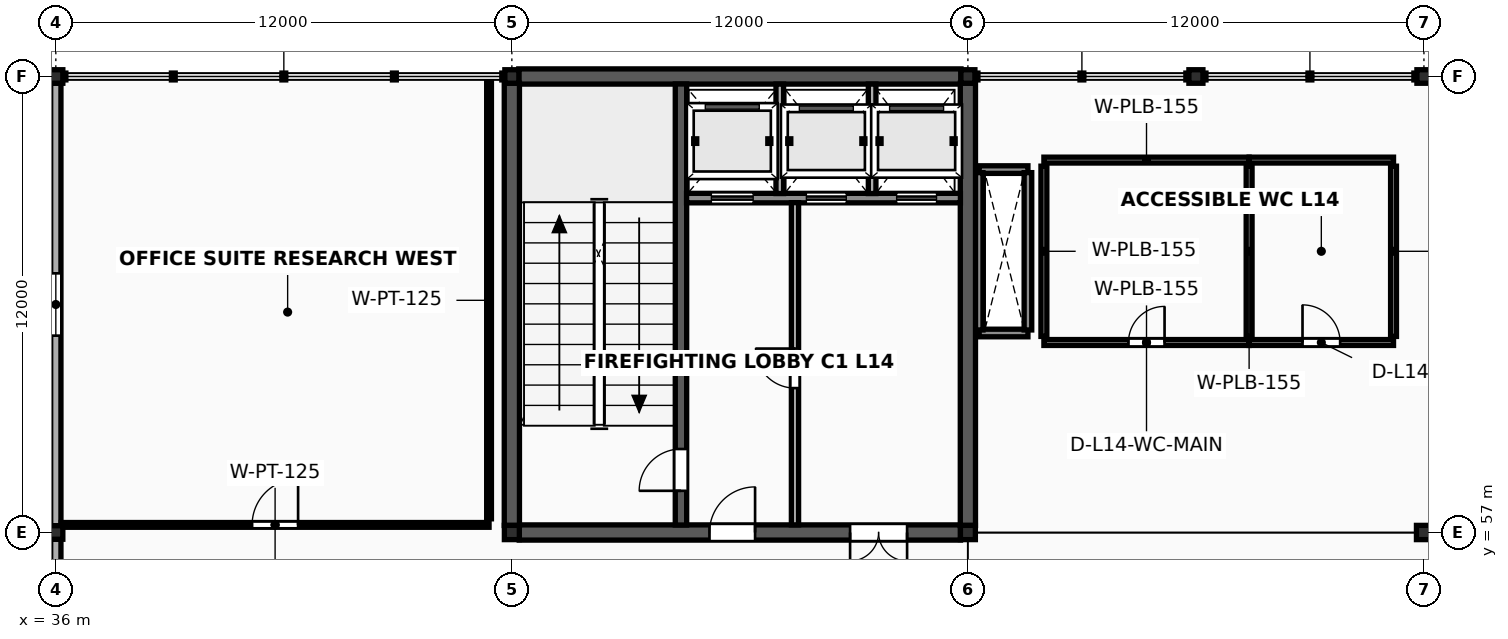
"""IFC4 building model, lengths in metres.
Left out: names, types, materials, properties, quantities, classifications, styles, units other than length and angle.
Written with IfcOpenShell. Run it as: python <this file> out.ifc"""

import sys

from ifc_helpers import new_model, si_unit, direction, frame, frame_2d, origin, origin_2d, place, context, subcontext, project, spatial, rectangle, i_section, extrude, element, fill, save


model = new_model("IFC4")
c1 = context("Model", 3, precision=1e-05, world=origin(), true_north=direction((0.0, 1.0)))
c2 = subcontext(c1, "Body", "Model", "MODEL_VIEW")
j1 = project(units=[si_unit("LENGTHUNIT", "METRE"), si_unit("PLANEANGLEUNIT", "RADIAN")], contexts=[c1])
p1 = place(None, origin())
s1 = spatial("IfcSite", under=j1, at=p1, CompositionType="ELEMENT")
p2 = place(p1, origin())
s2 = spatial("IfcBuilding", under=s1, at=p2, CompositionType="ELEMENT")
p3 = place(p2, frame((0.0, 0.0, 57.6)))
s3 = spatial("IfcBuildingStorey", under=s2, at=p3, CompositionType="ELEMENT", Elevation=57.6)
for number, where, z_axis, x_axis in (
    (1, (36.0, 57.0, 0.0), (0.0, 0.0, 1.0), (1.0, 0.0, 0.0)),
    (2, (36.0, 69.0, 0.0), (0.0, 0.0, 1.0), (1.0, 0.0, 0.0)),
):
    element("IfcColumn", number, at=place(p3, frame(where, z_axis=z_axis, x_axis=x_axis)), inside=s3, PredefinedType="COLUMN", context=c2, shape_type="SweptSolid", body=[
        extrude(i_section(OverallWidth=0.369, OverallDepth=0.356, WebThickness=0.011, FlangeThickness=0.018, FilletRadius=0.018, at=origin_2d()), origin(), (0.0, 0.0, 1.0), 4.0),
    ])
p4 = place(p3, frame((48.0, 57.0, 0.0), z_axis=(0.0, 0.0, 1.0), x_axis=(1.0, 0.0, 0.0)))
e3 = element("IfcColumn", 3, at=p4, inside=s3, PredefinedType="COLUMN", context=c2, shape_type="SweptSolid", body=[
    extrude(i_section(OverallWidth=0.394, OverallDepth=0.375, WebThickness=0.017, FlangeThickness=0.028, FilletRadius=0.018, at=origin_2d()), origin(), (0.0, 0.0, 1.0), 4.0),
])
p5 = place(p3, frame((48.0, 69.0, 0.0), z_axis=(0.0, 0.0, 1.0), x_axis=(1.0, 0.0, 0.0)))
e4 = element("IfcColumn", 4, at=p5, inside=s3, PredefinedType="COLUMN", context=c2, shape_type="SweptSolid", body=[
    extrude(i_section(OverallWidth=0.369, OverallDepth=0.356, WebThickness=0.011, FlangeThickness=0.018, FilletRadius=0.018, at=origin_2d()), origin(), (0.0, 0.0, 1.0), 4.0),
])
p6 = place(p3, frame((60.0, 57.0, 0.0), z_axis=(0.0, 0.0, 1.0), x_axis=(1.0, 0.0, 0.0)))
e5 = element("IfcColumn", 5, at=p6, inside=s3, PredefinedType="COLUMN", context=c2, shape_type="SweptSolid", body=[
    extrude(i_section(OverallWidth=0.394, OverallDepth=0.375, WebThickness=0.017, FlangeThickness=0.028, FilletRadius=0.018, at=origin_2d()), origin(), (0.0, 0.0, 1.0), 4.0),
])
p7 = place(p3, frame((60.0, 69.0, 0.0), z_axis=(0.0, 0.0, 1.0), x_axis=(1.0, 0.0, 0.0)))
e6 = element("IfcColumn", 6, at=p7, inside=s3, PredefinedType="COLUMN", context=c2, shape_type="SweptSolid", body=[
    extrude(i_section(OverallWidth=0.369, OverallDepth=0.356, WebThickness=0.011, FlangeThickness=0.018, FilletRadius=0.018, at=origin_2d()), origin(), (0.0, 0.0, 1.0), 4.0),
])
p8 = place(p3, frame((72.0, 57.0, 0.0), z_axis=(0.0, 0.0, 1.0), x_axis=(1.0, 0.0, 0.0)))
e7 = element("IfcColumn", 7, at=p8, inside=s3, PredefinedType="COLUMN", context=c2, shape_type="SweptSolid", body=[
    extrude(i_section(OverallWidth=0.394, OverallDepth=0.375, WebThickness=0.017, FlangeThickness=0.028, FilletRadius=0.018, at=origin_2d()), origin(), (0.0, 0.0, 1.0), 4.0),
])
for number, where, z_axis, x_axis in (
    (8, (72.0, 69.0, 0.0), (0.0, 0.0, 1.0), (1.0, 0.0, 0.0)),
    (9, (66.0, 69.0, 0.0), (0.0, 0.0, 1.0), (1.0, 0.0, 0.0)),
):
    element("IfcColumn", number, at=place(p3, frame(where, z_axis=z_axis, x_axis=x_axis)), inside=s3, PredefinedType="COLUMN", context=c2, shape_type="SweptSolid", body=[
        extrude(i_section(OverallWidth=0.369, OverallDepth=0.356, WebThickness=0.011, FlangeThickness=0.018, FilletRadius=0.018, at=origin_2d()), origin(), (0.0, 0.0, 1.0), 4.0),
    ])
for number, where, z_axis, x_axis in (
    (10, (60.297, 62.25, 0.0), (0.0, 0.0, 1.0), (1.0, 0.0, 0.0)),
    (11, (60.297, 66.55, 0.0), (0.0, 0.0, 1.0), (1.0, 0.0, 0.0)),
):
    element("IfcWall", number, at=place(p3, frame(where, z_axis=z_axis, x_axis=x_axis)), inside=s3, PredefinedType="SOLIDWALL", context=c2, shape_type="SweptSolid", body=[
        extrude(rectangle(XDim=1.283, YDim=0.2, at=frame_2d((0.642, 0.0))), origin(), (0.0, 0.0, 1.0), 3.853),
    ])
for number, where, z_axis, x_axis in (
    (12, (60.297, 62.33, 0.0), (0.0, 0.0, 1.0), (0.0, 1.0, 0.0)),
    (13, (61.58, 62.33, 0.0), (0.0, 0.0, 1.0), (0.0, 1.0, 0.0)),
):
    element("IfcWall", number, at=place(p3, frame(where, z_axis=z_axis, x_axis=x_axis)), inside=s3, PredefinedType="SOLIDWALL", context=c2, shape_type="SweptSolid", body=[
        extrude(rectangle(XDim=4.14, YDim=0.2, at=frame_2d((2.07, 0.0))), origin(), (0.0, 0.0, 1.0), 3.853),
    ])
p9 = place(p3, frame((48.194, 57.0, 0.0), z_axis=(0.0, 0.0, 1.0), x_axis=(1.0, 0.0, 0.0)))
e14 = element("IfcWall", 14, at=p9, inside=s3, PredefinedType="SHEAR", context=c2, shape_type="SweptSolid", body=[
    extrude(rectangle(XDim=11.612, YDim=0.4, at=frame_2d((5.806, 0.0))), origin(), (0.0, 0.0, 1.0), 3.853),
])
p10 = place(p9, frame((5.006, 0.0, 0.0)))
e15 = element("IfcOpeningElement", 15, at=p10, cuts=e14, PredefinedType="OPENING", context=c2, shape_type="SweptSolid", body=[
    extrude(rectangle(XDim=1.2, YDim=2.2, at=frame_2d((0.6, 1.1))), frame((0.0, 0.215, 0.0), z_axis=(0.0, -1.0, 0.0), x_axis=(1.0, 0.0, 0.0)), (0.0, 0.0, 1.0), 0.43),
])
p11 = place(p9, frame((8.706, 0.0, 0.0)))
e16 = element("IfcOpeningElement", 16, at=p11, cuts=e14, PredefinedType="OPENING", context=c2, shape_type="SweptSolid", body=[
    extrude(rectangle(XDim=1.5, YDim=2.25, at=frame_2d((0.75, 1.125))), frame((0.0, 0.215, 0.0), z_axis=(0.0, -1.0, 0.0), x_axis=(1.0, 0.0, 0.0)), (0.0, 0.0, 1.0), 0.43),
])
p12 = place(p3, frame((48.181, 69.0, 0.0), z_axis=(0.0, 0.0, 1.0), x_axis=(1.0, 0.0, 0.0)))
e17 = element("IfcWall", 17, at=p12, inside=s3, PredefinedType="SHEAR", context=c2, shape_type="SweptSolid", body=[
    extrude(rectangle(XDim=11.637, YDim=0.4, at=frame_2d((5.819, 0.0))), origin(), (0.0, 0.0, 1.0), 3.853),
])
for number, where, z_axis, x_axis in (
    (18, (48.0, 57.185, 0.0), (0.0, 0.0, 1.0), (0.0, 1.0, 0.0)),
    (19, (60.0, 57.185, 0.0), (0.0, 0.0, 1.0), (0.0, 1.0, 0.0)),
):
    element("IfcWall", number, at=place(p3, frame(where, z_axis=z_axis, x_axis=x_axis)), inside=s3, PredefinedType="SHEAR", context=c2, shape_type="SweptSolid", body=[
        extrude(rectangle(XDim=11.64, YDim=0.4, at=frame_2d((5.82, 0.0))), origin(), (0.0, 0.0, 1.0), 3.853),
    ])
p13 = place(p3, frame((52.45, 57.197, 0.0), z_axis=(0.0, 0.0, 1.0), x_axis=(0.0, 1.0, 0.0)))
e20 = element("IfcWall", 20, at=p13, inside=s3, PredefinedType="SHEAR", context=c2, shape_type="SweptSolid", body=[
    extrude(rectangle(XDim=11.606, YDim=0.3, at=frame_2d((5.803, 0.0))), origin(), (0.0, 0.0, 1.0), 3.853),
])
p14 = place(p13, frame((0.9, 0.0, 0.0)))
e21 = element("IfcOpeningElement", 21, at=p14, cuts=e20, PredefinedType="OPENING", context=c2, shape_type="SweptSolid", body=[
    extrude(rectangle(XDim=1.1, YDim=2.2, at=frame_2d((0.55, 1.1))), frame((0.0, 0.165, 0.0), z_axis=(0.0, -1.0, 0.0), x_axis=(1.0, 0.0, 0.0)), (0.0, 0.0, 1.0), 0.33),
])
p15 = place(p3, frame((52.597, 65.8, 0.0), z_axis=(0.0, 0.0, 1.0), x_axis=(1.0, 0.0, 0.0)))
e22 = element("IfcWall", 22, at=p15, inside=s3, PredefinedType="SOLIDWALL", context=c2, shape_type="SweptSolid", body=[
    extrude(rectangle(XDim=7.206, YDim=0.25, at=frame_2d((3.603, 0.0))), origin(), (0.0, 0.0, 1.0), 3.853),
])
p16 = place(p15, frame((0.653, 0.0, 0.0)))
e23 = element("IfcOpeningElement", 23, at=p16, cuts=e22, PredefinedType="OPENING", context=c2, shape_type="SweptSolid", body=[
    extrude(rectangle(XDim=1.1, YDim=2.24, at=frame_2d((0.55, 1.12))), frame((0.0, 0.14, 0.0), z_axis=(0.0, -1.0, 0.0), x_axis=(1.0, 0.0, 0.0)), (0.0, 0.0, 1.0), 0.28),
])
p17 = place(p15, frame((3.153, 0.0, 0.0)))
e24 = element("IfcOpeningElement", 24, at=p17, cuts=e22, PredefinedType="OPENING", context=c2, shape_type="SweptSolid", body=[
    extrude(rectangle(XDim=1.05, YDim=2.2, at=frame_2d((0.525, 1.1))), frame((0.0, 0.14, 0.0), z_axis=(0.0, -1.0, 0.0), x_axis=(1.0, 0.0, 0.0)), (0.0, 0.0, 1.0), 0.28),
])
p18 = place(p15, frame((5.528, 0.0, 0.0)))
e25 = element("IfcOpeningElement", 25, at=p18, cuts=e22, PredefinedType="OPENING", context=c2, shape_type="SweptSolid", body=[
    extrude(rectangle(XDim=1.05, YDim=2.2, at=frame_2d((0.525, 1.1))), frame((0.0, 0.14, 0.0), z_axis=(0.0, -1.0, 0.0), x_axis=(1.0, 0.0, 0.0)), (0.0, 0.0, 1.0), 0.28),
])
for number, where, z_axis, x_axis in (
    (26, (55.05, 65.92, 0.0), (0.0, 0.0, 1.0), (0.0, 1.0, 0.0)),
    (27, (57.48, 65.92, 0.0), (0.0, 0.0, 1.0), (0.0, 1.0, 0.0)),
):
    element("IfcWall", number, at=place(p3, frame(where, z_axis=z_axis, x_axis=x_axis)), inside=s3, PredefinedType="SOLIDWALL", context=c2, shape_type="SweptSolid", body=[
        extrude(rectangle(XDim=2.88, YDim=0.2, at=frame_2d((1.44, 0.0))), origin(), (0.0, 0.0, 1.0), 3.843),
    ])
p19 = place(p3, frame((55.45, 57.2, 0.0), z_axis=(0.0, 0.0, 1.0), x_axis=(0.0, 1.0, 0.0)))
e28 = element("IfcWall", 28, at=p19, inside=s3, PredefinedType="SOLIDWALL", context=c2, shape_type="SweptSolid", body=[
    extrude(rectangle(XDim=8.48, YDim=0.19, at=frame_2d((4.24, 0.0))), origin(), (0.0, 0.0, 1.0), 3.843),
])
p20 = place(p19, frame((3.6, 0.0, 0.0)))
e29 = element("IfcOpeningElement", 29, at=p20, cuts=e28, PredefinedType="OPENING", context=c2, shape_type="SweptSolid", body=[
    extrude(rectangle(XDim=1.04, YDim=2.18, at=frame_2d((0.52, 1.09))), frame((0.0, 0.11, 0.0), z_axis=(0.0, -1.0, 0.0), x_axis=(1.0, 0.0, 0.0)), (0.0, 0.0, 1.0), 0.22),
])
p21 = place(p3, frame((36.0, 45.176, 0.0), z_axis=(0.0, 0.0, 1.0), x_axis=(0.0, 1.0, 0.0)))
e30 = element("IfcWall", 30, at=p21, inside=s3, PredefinedType="SOLIDWALL", context=c2, shape_type="SweptSolid", body=[
    extrude(rectangle(XDim=11.648, YDim=0.27, at=frame_2d((5.824, 0.0))), origin(), (0.0, 0.0, 1.0), 3.216),
])
p22 = place(p21, frame((5.094, 0.0, 0.78)))
e31 = element("IfcOpeningElement", 31, at=p22, cuts=e30, PredefinedType="OPENING", context=c2, shape_type="SweptSolid", body=[
    extrude(rectangle(XDim=1.46, YDim=1.74, at=frame_2d((0.73, 0.87))), frame((0.0, 0.15, 0.0), z_axis=(0.0, -1.0, 0.0), x_axis=(1.0, 0.0, 0.0)), (0.0, 0.0, 1.0), 0.3),
])
p23 = place(p3, frame((36.0, 57.176, 0.0), z_axis=(0.0, 0.0, 1.0), x_axis=(0.0, 1.0, 0.0)))
e32 = element("IfcWall", 32, at=p23, inside=s3, PredefinedType="SOLIDWALL", context=c2, shape_type="SweptSolid", body=[
    extrude(rectangle(XDim=11.648, YDim=0.27, at=frame_2d((5.824, 0.0))), origin(), (0.0, 0.0, 1.0), 3.216),
])
p24 = place(p23, frame((5.004, 0.0, 0.78)))
e33 = element("IfcOpeningElement", 33, at=p24, cuts=e32, PredefinedType="OPENING", context=c2, shape_type="SweptSolid", body=[
    extrude(rectangle(XDim=1.64, YDim=1.74, at=frame_2d((0.82, 0.87))), frame((0.0, 0.15, 0.0), z_axis=(0.0, -1.0, 0.0), x_axis=(1.0, 0.0, 0.0)), (0.0, 0.0, 1.0), 0.3),
])
p25 = place(p3, frame((62.0, 62.0, 0.0), z_axis=(0.0, 0.0, 1.0), x_axis=(1.0, 0.0, 0.0)))
e34 = element("IfcWall", 34, at=p25, inside=s3, PredefinedType="PLUMBINGWALL", context=c2, shape_type="SweptSolid", body=[
    extrude(rectangle(XDim=5.4, YDim=0.155, at=frame_2d((2.7, 0.0))), origin(), (0.0, 0.0, 1.0), 2.88),
])
p26 = place(p25, frame((2.225, 0.0, 0.0)))
e35 = element("IfcOpeningElement", 35, at=p26, cuts=e34, PredefinedType="OPENING", context=c2, shape_type="SweptSolid", body=[
    extrude(rectangle(XDim=0.95, YDim=2.13, at=frame_2d((0.475, 1.065))), frame((0.0, 0.093, 0.0), z_axis=(0.0, -1.0, 0.0), x_axis=(1.0, 0.0, 0.0)), (0.0, 0.0, 1.0), 0.185),
])
p27 = place(p3, frame((62.0, 66.8, 0.0), z_axis=(0.0, 0.0, 1.0), x_axis=(1.0, 0.0, 0.0)))
e36 = element("IfcWall", 36, at=p27, inside=s3, PredefinedType="PLUMBINGWALL", context=c2, shape_type="SweptSolid", body=[
    extrude(rectangle(XDim=5.4, YDim=0.155, at=frame_2d((2.7, 0.0))), origin(), (0.0, 0.0, 1.0), 2.88),
])
for number, where, z_axis, x_axis in (
    (37, (62.0, 62.16, 0.0), (0.0, 0.0, 1.0), (0.0, 1.0, 0.0)),
    (38, (67.4, 62.16, 0.0), (0.0, 0.0, 1.0), (0.0, 1.0, 0.0)),
):
    element("IfcWall", number, at=place(p3, frame(where, z_axis=z_axis, x_axis=x_axis)), inside=s3, PredefinedType="PLUMBINGWALL", context=c2, shape_type="SweptSolid", body=[
        extrude(rectangle(XDim=4.48, YDim=0.155, at=frame_2d((2.24, 0.0))), origin(), (0.0, 0.0, 1.0), 2.88),
    ])
p28 = place(p3, frame((67.4, 62.0, 0.0), z_axis=(0.0, 0.0, 1.0), x_axis=(1.0, 0.0, 0.0)))
e39 = element("IfcWall", 39, at=p28, inside=s3, PredefinedType="PLUMBINGWALL", context=c2, shape_type="SweptSolid", body=[
    extrude(rectangle(XDim=3.8, YDim=0.155, at=frame_2d((1.9, 0.0))), origin(), (0.0, 0.0, 1.0), 2.88),
])
p29 = place(p28, frame((1.405, 0.0, 0.0)))
e40 = element("IfcOpeningElement", 40, at=p29, cuts=e39, PredefinedType="OPENING", context=c2, shape_type="SweptSolid", body=[
    extrude(rectangle(XDim=0.99, YDim=2.15, at=frame_2d((0.495, 1.075))), frame((0.0, 0.093, 0.0), z_axis=(0.0, -1.0, 0.0), x_axis=(1.0, 0.0, 0.0)), (0.0, 0.0, 1.0), 0.185),
])
p30 = place(p3, frame((67.4, 66.8, 0.0), z_axis=(0.0, 0.0, 1.0), x_axis=(1.0, 0.0, 0.0)))
e41 = element("IfcWall", 41, at=p30, inside=s3, PredefinedType="PLUMBINGWALL", context=c2, shape_type="SweptSolid", body=[
    extrude(rectangle(XDim=3.8, YDim=0.155, at=frame_2d((1.9, 0.0))), origin(), (0.0, 0.0, 1.0), 2.88),
])
p31 = place(p3, frame((71.2, 62.16, 0.0), z_axis=(0.0, 0.0, 1.0), x_axis=(0.0, 1.0, 0.0)))
e42 = element("IfcWall", 42, at=p31, inside=s3, PredefinedType="PLUMBINGWALL", context=c2, shape_type="SweptSolid", body=[
    extrude(rectangle(XDim=4.48, YDim=0.155, at=frame_2d((2.24, 0.0))), origin(), (0.0, 0.0, 1.0), 2.88),
])
p32 = place(p3, frame((36.14, 57.2, 0.0), z_axis=(0.0, 0.0, 1.0), x_axis=(1.0, 0.0, 0.0)))
e43 = element("IfcWall", 43, at=p32, inside=s3, PredefinedType="PARTITIONING", context=c2, shape_type="SweptSolid", body=[
    extrude(rectangle(XDim=11.26, YDim=0.125, at=frame_2d((5.63, 0.0))), origin(), (0.0, 0.0, 1.0), 2.88),
])
p33 = place(p32, frame((5.025, 0.0, 0.0)))
e44 = element("IfcOpeningElement", 44, at=p33, cuts=e43, PredefinedType="OPENING", context=c2, shape_type="SweptSolid", body=[
    extrude(rectangle(XDim=1.21, YDim=2.25, at=frame_2d((0.605, 1.125))), frame((0.0, 0.077, 0.0), z_axis=(0.0, -1.0, 0.0), x_axis=(1.0, 0.0, 0.0)), (0.0, 0.0, 1.0), 0.155),
])
p34 = place(p3, frame((47.4, 57.36, 0.0), z_axis=(0.0, 0.0, 1.0), x_axis=(0.0, 1.0, 0.0)))
e45 = element("IfcWall", 45, at=p34, inside=s3, PredefinedType="PARTITIONING", context=c2, shape_type="SweptSolid", body=[
    extrude(rectangle(XDim=11.5, YDim=0.125, at=frame_2d((5.75, 0.0))), origin(), (0.0, 0.0, 1.0), 2.88),
])
p35 = place(p24, origin())
e46 = element("IfcWindow", 46, at=p35, inside=s3, PartitioningType="SINGLE_PANEL", PredefinedType="WINDOW", context=c2, shape_type="SweptSolid", body=[
    extrude(rectangle(XDim=1.64, YDim=1.74, at=frame_2d((0.82, 0.87))), frame((0.0, 0.03, 0.0), z_axis=(0.0, -1.0, 0.0), x_axis=(1.0, 0.0, 0.0)), (0.0, 0.0, 1.0), 0.06),
])
fill(e33, e46)
p36 = place(p14, origin())
e47 = element("IfcDoor", 47, at=p36, inside=s3, OperationType="SINGLE_SWING_LEFT", PredefinedType="DOOR", context=c2, shape_type="SweptSolid", body=[
    extrude(rectangle(XDim=1.1, YDim=2.2, at=frame_2d((0.55, 1.1))), frame((0.0, 0.025, 0.0), z_axis=(0.0, -1.0, 0.0), x_axis=(1.0, 0.0, 0.0)), (0.0, 0.0, 1.0), 0.05),
])
fill(e21, e47)
p37 = place(p20, origin())
e48 = element("IfcDoor", 48, at=p37, inside=s3, OperationType="SINGLE_SWING_RIGHT", PredefinedType="DOOR", context=c2, shape_type="SweptSolid", body=[
    extrude(rectangle(XDim=1.04, YDim=2.18, at=frame_2d((0.52, 1.09))), frame((0.0, 0.025, 0.0), z_axis=(0.0, -1.0, 0.0), x_axis=(1.0, 0.0, 0.0)), (0.0, 0.0, 1.0), 0.05),
])
fill(e29, e48)
p38 = place(p10, origin())
e49 = element("IfcDoor", 49, at=p38, inside=s3, OperationType="SINGLE_SWING_RIGHT", PredefinedType="DOOR", context=c2, shape_type="SweptSolid", body=[
    extrude(rectangle(XDim=1.2, YDim=2.2, at=frame_2d((0.6, 1.1))), frame((0.0, 0.025, 0.0), z_axis=(0.0, -1.0, 0.0), x_axis=(1.0, 0.0, 0.0)), (0.0, 0.0, 1.0), 0.05),
])
fill(e15, e49)
p39 = place(p11, origin())
e50 = element("IfcDoor", 50, at=p39, inside=s3, OperationType="DOUBLE_DOOR_SINGLE_SWING", PredefinedType="DOOR", context=c2, shape_type="SweptSolid", body=[
    extrude(rectangle(XDim=1.5, YDim=2.25, at=frame_2d((0.75, 1.125))), frame((0.0, 0.025, 0.0), z_axis=(0.0, -1.0, 0.0), x_axis=(1.0, 0.0, 0.0)), (0.0, 0.0, 1.0), 0.05),
])
fill(e16, e50)
p40 = place(p16, origin())
e51 = element("IfcDoor", 51, at=p40, inside=s3, OperationType="SLIDING_TO_LEFT", PredefinedType="USERDEFINED", context=c2, shape_type="SweptSolid", body=[
    extrude(rectangle(XDim=1.1, YDim=2.24, at=frame_2d((0.55, 1.12))), frame((0.0, 0.025, 0.0), z_axis=(0.0, -1.0, 0.0), x_axis=(1.0, 0.0, 0.0)), (0.0, 0.0, 1.0), 0.05),
])
fill(e23, e51)
p41 = place(p17, origin())
e52 = element("IfcDoor", 52, at=p41, inside=s3, OperationType="SLIDING_TO_LEFT", PredefinedType="USERDEFINED", context=c2, shape_type="SweptSolid", body=[
    extrude(rectangle(XDim=1.05, YDim=2.2, at=frame_2d((0.525, 1.1))), frame((0.0, 0.025, 0.0), z_axis=(0.0, -1.0, 0.0), x_axis=(1.0, 0.0, 0.0)), (0.0, 0.0, 1.0), 0.05),
])
fill(e24, e52)
p42 = place(p18, origin())
e53 = element("IfcDoor", 53, at=p42, inside=s3, OperationType="SLIDING_TO_LEFT", PredefinedType="USERDEFINED", context=c2, shape_type="SweptSolid", body=[
    extrude(rectangle(XDim=1.05, YDim=2.2, at=frame_2d((0.525, 1.1))), frame((0.0, 0.025, 0.0), z_axis=(0.0, -1.0, 0.0), x_axis=(1.0, 0.0, 0.0)), (0.0, 0.0, 1.0), 0.05),
])
fill(e25, e53)
p43 = place(p26, origin())
e54 = element("IfcDoor", 54, at=p43, inside=s3, OperationType="SINGLE_SWING_RIGHT", PredefinedType="DOOR", context=c2, shape_type="SweptSolid", body=[
    extrude(rectangle(XDim=0.95, YDim=2.13, at=frame_2d((0.475, 1.065))), frame((0.0, 0.025, 0.0), z_axis=(0.0, -1.0, 0.0), x_axis=(1.0, 0.0, 0.0)), (0.0, 0.0, 1.0), 0.05),
])
fill(e35, e54)
p44 = place(p29, origin())
e55 = element("IfcDoor", 55, at=p44, inside=s3, OperationType="SINGLE_SWING_LEFT", PredefinedType="DOOR", context=c2, shape_type="SweptSolid", body=[
    extrude(rectangle(XDim=0.99, YDim=2.15, at=frame_2d((0.495, 1.075))), frame((0.0, 0.025, 0.0), z_axis=(0.0, -1.0, 0.0), x_axis=(1.0, 0.0, 0.0)), (0.0, 0.0, 1.0), 0.05),
])
fill(e40, e55)
p45 = place(p33, origin())
e56 = element("IfcDoor", 56, at=p45, inside=s3, OperationType="SINGLE_SWING_RIGHT", PredefinedType="DOOR", context=c2, shape_type="SweptSolid", body=[
    extrude(rectangle(XDim=1.21, YDim=2.25, at=frame_2d((0.605, 1.125))), frame((0.0, 0.025, 0.0), z_axis=(0.0, -1.0, 0.0), x_axis=(1.0, 0.0, 0.0)), (0.0, 0.0, 1.0), 0.05),
])
fill(e44, e56)
save(model, sys.argv[1])
